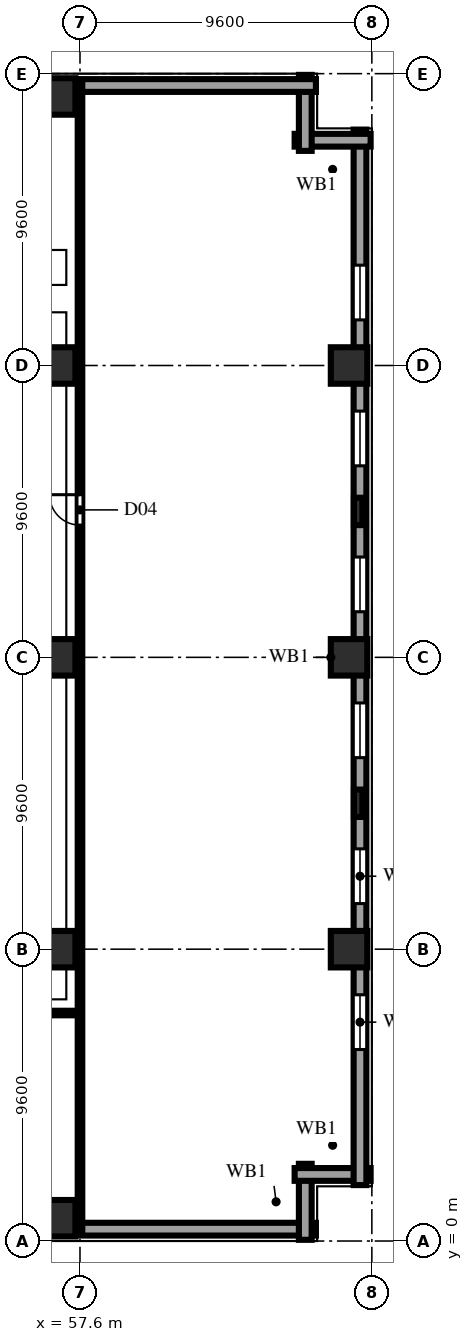
"""IFC4 building model, lengths in metres.
Left out: names, types, materials, properties, quantities, classifications, styles, units other than length and angle.
Written with IfcOpenShell. Run it as: python <this file> out.ifc"""

import sys

from ifc_helpers import new_model, si_unit, direction, frame, frame_2d, origin, origin_2d, place, context, subcontext, project, spatial, rectangle, extrude, element, fill, save


model = new_model("IFC4")
c1 = context("Model", 3, precision=1e-05, world=origin(), true_north=direction((0.0, 1.0)))
c2 = subcontext(c1, "Body", "Model", "MODEL_VIEW")
j1 = project(units=[si_unit("LENGTHUNIT", "METRE"), si_unit("PLANEANGLEUNIT", "RADIAN")], contexts=[c1])
p1 = place(None, origin())
s1 = spatial("IfcSite", under=j1, at=p1, CompositionType="ELEMENT")
p2 = place(p1, origin())
s2 = spatial("IfcBuilding", under=s1, at=p2, CompositionType="ELEMENT")
p3 = place(p2, frame((0.0, 0.0, 47.0)))
s3 = spatial("IfcBuildingStorey", under=s2, at=p3, CompositionType="ELEMENT", Elevation=47.0)
for number, where, z_axis, x_axis in (
    (1, (56.85, 0.75, 0.0), (0.0, 0.0, 1.0), (1.0, 0.0, 0.0)),
    (2, (56.85, 9.6, 0.0), (0.0, 0.0, 1.0), (1.0, 0.0, 0.0)),
    (3, (56.85, 19.2, 0.0), (0.0, 0.0, 1.0), (1.0, 0.0, 0.0)),
    (4, (56.85, 28.8, 0.0), (0.0, 0.0, 1.0), (1.0, 0.0, 0.0)),
    (5, (56.85, 37.65, 0.0), (0.0, 0.0, 1.0), (1.0, 0.0, 0.0)),
    (6, (66.45, 9.6, 0.0), (0.0, 0.0, 1.0), (1.0, 0.0, 0.0)),
    (7, (66.45, 19.2, 0.0), (0.0, 0.0, 1.0), (1.0, 0.0, 0.0)),
    (8, (66.45, 28.8, 0.0), (0.0, 0.0, 1.0), (1.0, 0.0, 0.0)),
):
    element("IfcColumn", number, at=place(p3, frame(where, z_axis=z_axis, x_axis=x_axis)), inside=s3, PredefinedType="COLUMN", context=c2, shape_type="SweptSolid", body=[
        extrude(rectangle(XDim=1.2, YDim=1.2, at=origin_2d()), origin(), (0.0, 0.0, 1.0), 3.8),
    ])
for number, where, z_axis, x_axis in (
    (9, (66.75, 14.4, 0.0), (0.0, 0.0, 1.0), (0.0, 1.0, 0.0)),
    (10, (66.75, 24.0, 0.0), (0.0, 0.0, 1.0), (0.0, 1.0, 0.0)),
):
    element("IfcColumn", number, at=place(p3, frame(where, z_axis=z_axis, x_axis=x_axis)), inside=s3, PredefinedType="PILASTER", context=c2, shape_type="SweptSolid", body=[
        extrude(rectangle(XDim=0.9, YDim=0.28, at=origin_2d()), origin(), (0.0, 0.0, 1.0), 3.8),
    ])
p4 = place(p3, frame((1.84, 0.39, 0.0), z_axis=(0.0, 0.0, 1.0), x_axis=(1.0, 0.0, 0.0)))
e11 = element("IfcWall", 11, at=p4, inside=s3, PredefinedType="SOLIDWALL", context=c2, shape_type="SweptSolid", body=[
    extrude(rectangle(XDim=63.52, YDim=0.42, at=frame_2d((31.76, 0.0))), origin(), (0.0, 0.0, 1.0), 3.54),
])
p5 = place(p4, frame((4.16, 0.0, 0.85)))
e12 = element("IfcOpeningElement", 12, at=p5, cuts=e11, PredefinedType="OPENING", context=c2, shape_type="SweptSolid", body=[
    extrude(rectangle(XDim=2.4, YDim=1.85, at=frame_2d((1.2, 0.925))), frame((0.0, 0.222, 0.0), z_axis=(0.0, -1.0, 0.0), x_axis=(1.0, 0.0, 0.0)), (0.0, 0.0, 1.0), 0.444),
])
p6 = place(p4, frame((8.96, 0.0, 0.85)))
e13 = element("IfcOpeningElement", 13, at=p6, cuts=e11, PredefinedType="OPENING", context=c2, shape_type="SweptSolid", body=[
    extrude(rectangle(XDim=2.4, YDim=1.85, at=frame_2d((1.2, 0.925))), frame((0.0, 0.222, 0.0), z_axis=(0.0, -1.0, 0.0), x_axis=(1.0, 0.0, 0.0)), (0.0, 0.0, 1.0), 0.444),
])
p7 = place(p4, frame((13.76, 0.0, 0.85)))
e14 = element("IfcOpeningElement", 14, at=p7, cuts=e11, PredefinedType="OPENING", context=c2, shape_type="SweptSolid", body=[
    extrude(rectangle(XDim=2.4, YDim=1.85, at=frame_2d((1.2, 0.925))), frame((0.0, 0.222, 0.0), z_axis=(0.0, -1.0, 0.0), x_axis=(1.0, 0.0, 0.0)), (0.0, 0.0, 1.0), 0.444),
])
p8 = place(p4, frame((18.56, 0.0, 0.85)))
e15 = element("IfcOpeningElement", 15, at=p8, cuts=e11, PredefinedType="OPENING", context=c2, shape_type="SweptSolid", body=[
    extrude(rectangle(XDim=2.4, YDim=1.85, at=frame_2d((1.2, 0.925))), frame((0.0, 0.222, 0.0), z_axis=(0.0, -1.0, 0.0), x_axis=(1.0, 0.0, 0.0)), (0.0, 0.0, 1.0), 0.444),
])
p9 = place(p4, frame((23.36, 0.0, 0.85)))
e16 = element("IfcOpeningElement", 16, at=p9, cuts=e11, PredefinedType="OPENING", context=c2, shape_type="SweptSolid", body=[
    extrude(rectangle(XDim=2.4, YDim=1.85, at=frame_2d((1.2, 0.925))), frame((0.0, 0.222, 0.0), z_axis=(0.0, -1.0, 0.0), x_axis=(1.0, 0.0, 0.0)), (0.0, 0.0, 1.0), 0.444),
])
p10 = place(p4, frame((28.16, 0.0, 0.85)))
e17 = element("IfcOpeningElement", 17, at=p10, cuts=e11, PredefinedType="OPENING", context=c2, shape_type="SweptSolid", body=[
    extrude(rectangle(XDim=2.4, YDim=1.85, at=frame_2d((1.2, 0.925))), frame((0.0, 0.222, 0.0), z_axis=(0.0, -1.0, 0.0), x_axis=(1.0, 0.0, 0.0)), (0.0, 0.0, 1.0), 0.444),
])
for number, where, z_axis, x_axis in (
    (18, (65.01, 0.04, 0.0), (0.0, 0.0, 1.0), (0.0, 1.0, 0.0)),
    (19, (64.66, 2.19, 0.0), (0.0, 0.0, 1.0), (1.0, 0.0, 0.0)),
):
    element("IfcWall", number, at=place(p3, frame(where, z_axis=z_axis, x_axis=x_axis)), inside=s3, PredefinedType="SOLIDWALL", context=c2, shape_type="SweptSolid", body=[
        extrude(rectangle(XDim=2.5, YDim=0.42, at=frame_2d((1.25, 0.0))), origin(), (0.0, 0.0, 1.0), 3.54),
    ])
p11 = place(p3, frame((66.81, 1.84, 0.0), z_axis=(0.0, 0.0, 1.0), x_axis=(0.0, 1.0, 0.0)))
e20 = element("IfcWall", 20, at=p11, inside=s3, PredefinedType="SOLIDWALL", context=c2, shape_type="SweptSolid", body=[
    extrude(rectangle(XDim=34.72, YDim=0.42, at=frame_2d((17.36, 0.0))), origin(), (0.0, 0.0, 1.0), 3.54),
])
p12 = place(p11, frame((4.46, 0.0, 0.85)))
e21 = element("IfcOpeningElement", 21, at=p12, cuts=e20, PredefinedType="OPENING", context=c2, shape_type="SweptSolid", body=[
    extrude(rectangle(XDim=1.8, YDim=1.85, at=frame_2d((0.9, 0.925))), frame((0.0, 0.222, 0.0), z_axis=(0.0, -1.0, 0.0), x_axis=(1.0, 0.0, 0.0)), (0.0, 0.0, 1.0), 0.444),
])
p13 = place(p11, frame((9.26, 0.0, 0.85)))
e22 = element("IfcOpeningElement", 22, at=p13, cuts=e20, PredefinedType="OPENING", context=c2, shape_type="SweptSolid", body=[
    extrude(rectangle(XDim=1.8, YDim=1.85, at=frame_2d((0.9, 0.925))), frame((0.0, 0.222, 0.0), z_axis=(0.0, -1.0, 0.0), x_axis=(1.0, 0.0, 0.0)), (0.0, 0.0, 1.0), 0.444),
])
p14 = place(p11, frame((14.06, 0.0, 0.85)))
e23 = element("IfcOpeningElement", 23, at=p14, cuts=e20, PredefinedType="OPENING", context=c2, shape_type="SweptSolid", body=[
    extrude(rectangle(XDim=1.8, YDim=1.85, at=frame_2d((0.9, 0.925))), frame((0.0, 0.222, 0.0), z_axis=(0.0, -1.0, 0.0), x_axis=(1.0, 0.0, 0.0)), (0.0, 0.0, 1.0), 0.444),
])
p15 = place(p11, frame((18.86, 0.0, 0.85)))
e24 = element("IfcOpeningElement", 24, at=p15, cuts=e20, PredefinedType="OPENING", context=c2, shape_type="SweptSolid", body=[
    extrude(rectangle(XDim=1.8, YDim=1.85, at=frame_2d((0.9, 0.925))), frame((0.0, 0.222, 0.0), z_axis=(0.0, -1.0, 0.0), x_axis=(1.0, 0.0, 0.0)), (0.0, 0.0, 1.0), 0.444),
])
p16 = place(p11, frame((23.66, 0.0, 0.85)))
e25 = element("IfcOpeningElement", 25, at=p16, cuts=e20, PredefinedType="OPENING", context=c2, shape_type="SweptSolid", body=[
    extrude(rectangle(XDim=1.8, YDim=1.85, at=frame_2d((0.9, 0.925))), frame((0.0, 0.222, 0.0), z_axis=(0.0, -1.0, 0.0), x_axis=(1.0, 0.0, 0.0)), (0.0, 0.0, 1.0), 0.444),
])
p17 = place(p11, frame((28.46, 0.0, 0.85)))
e26 = element("IfcOpeningElement", 26, at=p17, cuts=e20, PredefinedType="OPENING", context=c2, shape_type="SweptSolid", body=[
    extrude(rectangle(XDim=1.8, YDim=1.85, at=frame_2d((0.9, 0.925))), frame((0.0, 0.222, 0.0), z_axis=(0.0, -1.0, 0.0), x_axis=(1.0, 0.0, 0.0)), (0.0, 0.0, 1.0), 0.444),
])
for number, where, z_axis, x_axis in (
    (27, (67.16, 36.21, 0.0), (0.0, 0.0, 1.0), (-1.0, 0.0, 0.0)),
    (28, (65.01, 35.86, 0.0), (0.0, 0.0, 1.0), (0.0, 1.0, 0.0)),
):
    element("IfcWall", number, at=place(p3, frame(where, z_axis=z_axis, x_axis=x_axis)), inside=s3, PredefinedType="SOLIDWALL", context=c2, shape_type="SweptSolid", body=[
        extrude(rectangle(XDim=2.5, YDim=0.42, at=frame_2d((1.25, 0.0))), origin(), (0.0, 0.0, 1.0), 3.54),
    ])
p18 = place(p3, frame((65.36, 38.01, 0.0), z_axis=(0.0, 0.0, 1.0), x_axis=(-1.0, 0.0, 0.0)))
e29 = element("IfcWall", 29, at=p18, inside=s3, PredefinedType="SOLIDWALL", context=c2, shape_type="SweptSolid", body=[
    extrude(rectangle(XDim=27.7, YDim=0.42, at=frame_2d((13.85, 0.0))), origin(), (0.0, 0.0, 1.0), 3.54),
])
p19 = place(p3, frame((0.22, 7.5, 0.0), z_axis=(0.0, 0.0, 1.0), x_axis=(1.0, 0.0, 0.0)))
e30 = element("IfcWall", 30, at=p19, inside=s3, PredefinedType="PARTITIONING", context=c2, shape_type="SweptSolid", body=[
    extrude(rectangle(XDim=57.38, YDim=0.15, at=frame_2d((28.69, 0.0))), origin(), (0.0, 0.0, 1.0), 3.54),
])
p20 = place(p19, frame((13.68, 0.0, 0.0)))
e31 = element("IfcOpeningElement", 31, at=p20, cuts=e30, PredefinedType="OPENING", context=c2, shape_type="SweptSolid", body=[
    extrude(rectangle(XDim=1.0, YDim=2.2, at=frame_2d((0.5, 1.1))), frame((0.0, 0.087, 0.0), z_axis=(0.0, -1.0, 0.0), x_axis=(1.0, 0.0, 0.0)), (0.0, 0.0, 1.0), 0.174),
])
p21 = place(p19, frame((23.28, 0.0, 0.0)))
e32 = element("IfcOpeningElement", 32, at=p21, cuts=e30, PredefinedType="OPENING", context=c2, shape_type="SweptSolid", body=[
    extrude(rectangle(XDim=1.0, YDim=2.2, at=frame_2d((0.5, 1.1))), frame((0.0, 0.087, 0.0), z_axis=(0.0, -1.0, 0.0), x_axis=(1.0, 0.0, 0.0)), (0.0, 0.0, 1.0), 0.174),
])
p22 = place(p19, frame((51.23, 0.0, 0.0)))
e33 = element("IfcOpeningElement", 33, at=p22, cuts=e30, PredefinedType="OPENING", context=c2, shape_type="SweptSolid", body=[
    extrude(rectangle(XDim=1.2, YDim=2.2, at=frame_2d((0.6, 1.1))), frame((0.0, 0.087, 0.0), z_axis=(0.0, -1.0, 0.0), x_axis=(1.0, 0.0, 0.0)), (0.0, 0.0, 1.0), 0.174),
])
p23 = place(p3, frame((57.6, 0.22, 0.0), z_axis=(0.0, 0.0, 1.0), x_axis=(0.0, 1.0, 0.0)))
e34 = element("IfcWall", 34, at=p23, inside=s3, PredefinedType="PARTITIONING", context=c2, shape_type="SweptSolid", body=[
    extrude(rectangle(XDim=37.96, YDim=0.15, at=frame_2d((18.98, 0.0))), origin(), (0.0, 0.0, 1.0), 3.54),
])
p24 = place(p23, frame((23.33, 0.0, 0.0)))
e35 = element("IfcOpeningElement", 35, at=p24, cuts=e34, PredefinedType="OPENING", context=c2, shape_type="SweptSolid", body=[
    extrude(rectangle(XDim=1.0, YDim=2.2, at=frame_2d((0.5, 1.1))), frame((0.0, 0.087, 0.0), z_axis=(0.0, -1.0, 0.0), x_axis=(1.0, 0.0, 0.0)), (0.0, 0.0, 1.0), 0.174),
])
p25 = place(p12, origin())
e36 = element("IfcWindow", 36, at=p25, inside=s3, PartitioningType="DOUBLE_PANEL_VERTICAL", PredefinedType="WINDOW", context=c2, shape_type="SweptSolid", body=[
    extrude(rectangle(XDim=1.8, YDim=1.85, at=frame_2d((0.9, 0.925))), frame((0.0, 0.11, 0.0), z_axis=(0.0, -1.0, 0.0), x_axis=(1.0, 0.0, 0.0)), (0.0, 0.0, 1.0), 0.06),
])
fill(e21, e36)
p26 = place(p13, origin())
e37 = element("IfcWindow", 37, at=p26, inside=s3, PartitioningType="DOUBLE_PANEL_VERTICAL", PredefinedType="WINDOW", context=c2, shape_type="SweptSolid", body=[
    extrude(rectangle(XDim=1.8, YDim=1.85, at=frame_2d((0.9, 0.925))), frame((0.0, 0.11, 0.0), z_axis=(0.0, -1.0, 0.0), x_axis=(1.0, 0.0, 0.0)), (0.0, 0.0, 1.0), 0.06),
])
fill(e22, e37)
p27 = place(p14, origin())
e38 = element("IfcWindow", 38, at=p27, inside=s3, PartitioningType="DOUBLE_PANEL_VERTICAL", PredefinedType="WINDOW", context=c2, shape_type="SweptSolid", body=[
    extrude(rectangle(XDim=1.8, YDim=1.85, at=frame_2d((0.9, 0.925))), frame((0.0, 0.11, 0.0), z_axis=(0.0, -1.0, 0.0), x_axis=(1.0, 0.0, 0.0)), (0.0, 0.0, 1.0), 0.06),
])
fill(e23, e38)
p28 = place(p15, origin())
e39 = element("IfcWindow", 39, at=p28, inside=s3, PartitioningType="DOUBLE_PANEL_VERTICAL", PredefinedType="WINDOW", context=c2, shape_type="SweptSolid", body=[
    extrude(rectangle(XDim=1.8, YDim=1.85, at=frame_2d((0.9, 0.925))), frame((0.0, 0.11, 0.0), z_axis=(0.0, -1.0, 0.0), x_axis=(1.0, 0.0, 0.0)), (0.0, 0.0, 1.0), 0.06),
])
fill(e24, e39)
p29 = place(p16, origin())
e40 = element("IfcWindow", 40, at=p29, inside=s3, PartitioningType="DOUBLE_PANEL_VERTICAL", PredefinedType="WINDOW", context=c2, shape_type="SweptSolid", body=[
    extrude(rectangle(XDim=1.8, YDim=1.85, at=frame_2d((0.9, 0.925))), frame((0.0, 0.11, 0.0), z_axis=(0.0, -1.0, 0.0), x_axis=(1.0, 0.0, 0.0)), (0.0, 0.0, 1.0), 0.06),
])
fill(e25, e40)
p30 = place(p17, origin())
e41 = element("IfcWindow", 41, at=p30, inside=s3, PartitioningType="DOUBLE_PANEL_VERTICAL", PredefinedType="WINDOW", context=c2, shape_type="SweptSolid", body=[
    extrude(rectangle(XDim=1.8, YDim=1.85, at=frame_2d((0.9, 0.925))), frame((0.0, 0.11, 0.0), z_axis=(0.0, -1.0, 0.0), x_axis=(1.0, 0.0, 0.0)), (0.0, 0.0, 1.0), 0.06),
])
fill(e26, e41)
p31 = place(p24, origin())
e42 = element("IfcDoor", 42, at=p31, inside=s3, OperationType="SINGLE_SWING_RIGHT", PredefinedType="DOOR", context=c2, shape_type="SweptSolid", body=[
    extrude(rectangle(XDim=1.0, YDim=2.2, at=frame_2d((0.5, 1.1))), frame((0.0, 0.025, 0.0), z_axis=(0.0, -1.0, 0.0), x_axis=(1.0, 0.0, 0.0)), (0.0, 0.0, 1.0), 0.05),
])
fill(e35, e42)
save(model, sys.argv[1])
